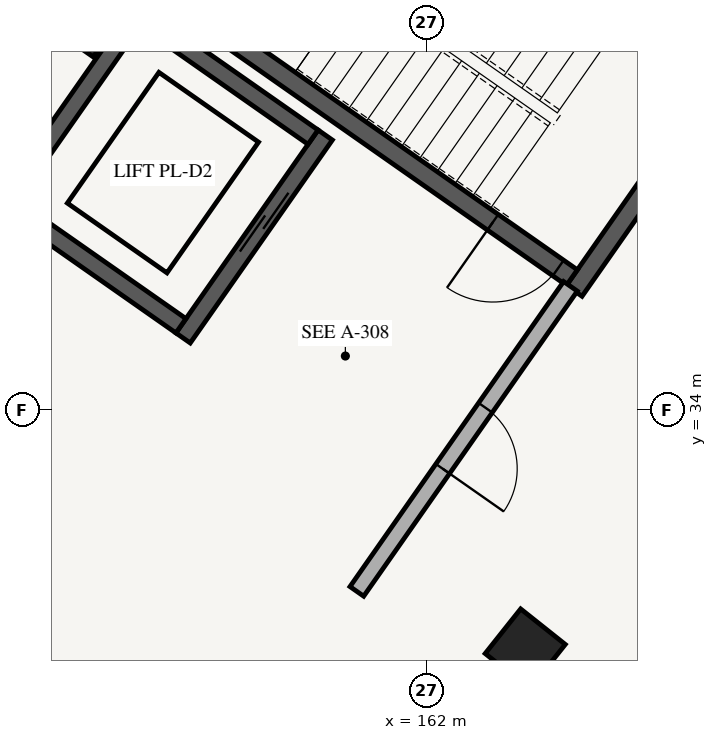
"""IFC4 building model, lengths in metres.
Left out: names, types, materials, properties, quantities, classifications, styles, units other than length and angle.
Written with IfcOpenShell. Run it as: python <this file> out.ifc"""

import sys

from ifc_helpers import new_model, si_unit, direction, frame, frame_2d, origin, origin_2d, place, context, subcontext, project, spatial, rectangle, extrude, element, fill, save


model = new_model("IFC4")
c1 = context("Model", 3, precision=1e-05, world=origin(), true_north=direction((0.0, 1.0)))
c2 = subcontext(c1, "Body", "Model", "MODEL_VIEW")
j1 = project(units=[si_unit("LENGTHUNIT", "METRE"), si_unit("PLANEANGLEUNIT", "RADIAN")], contexts=[c1])
p1 = place(None, origin())
s1 = spatial("IfcSite", under=j1, at=p1, CompositionType="ELEMENT")
p2 = place(p1, origin())
s2 = spatial("IfcBuilding", under=s1, at=p2, CompositionType="ELEMENT")
p3 = place(p2, frame((0.0, 0.0, -4.2)))
s3 = spatial("IfcBuildingStorey", under=s2, at=p3, CompositionType="ELEMENT", Elevation=-4.2)
p4 = place(p3, frame((165.733, 38.336, 0.0), z_axis=(0.0, 0.0, 1.0), x_axis=(-0.819153711596, 0.573574055182, 0.0)))
e1 = element("IfcWall", 1, at=p4, inside=s3, PredefinedType="SHEAR", context=c2, shape_type="SweptSolid", body=[
    extrude(rectangle(XDim=6.6, YDim=0.25, at=frame_2d((3.3, 0.0))), origin(), (0.0, 0.0, 1.0), 3.92),
])
p5 = place(p3, frame((165.907, 38.366, 0.0), z_axis=(0.0, 0.0, 1.0), x_axis=(-0.573582112484, -0.819148069789, 0.0)))
e2 = element("IfcWall", 2, at=p5, inside=s3, PredefinedType="SHEAR", context=c2, shape_type="SweptSolid", body=[
    extrude(rectangle(XDim=3.42, YDim=0.25, at=frame_2d((1.71, 0.0))), origin(), (0.0, 0.0, 1.0), 3.92),
])
p6 = place(p3, frame((163.914, 35.739, 0.0), z_axis=(0.0, 0.0, 1.0), x_axis=(-0.819153711596, 0.573574055182, 0.0)))
e3 = element("IfcWall", 3, at=p6, inside=s3, PredefinedType="SHEAR", context=c2, shape_type="SweptSolid", body=[
    extrude(rectangle(XDim=6.6, YDim=0.25, at=frame_2d((3.3, 0.0))), origin(), (0.0, 0.0, 1.0), 3.92),
])
p7 = place(p6, frame((0.22, 0.0, 0.0)))
e4 = element("IfcOpeningElement", 4, at=p7, cuts=e3, PredefinedType="OPENING", context=c2, shape_type="SweptSolid", body=[
    extrude(rectangle(XDim=1.05, YDim=2.15, at=frame_2d((0.525, 1.075))), frame((0.0, 0.135, 0.0), z_axis=(0.0, -1.0, 0.0), x_axis=(1.0, 0.0, 0.0)), (0.0, 0.0, 1.0), 0.27),
])
p8 = place(p3, frame((160.668, 37.615, 0.0), z_axis=(0.0, 0.0, 1.0), x_axis=(-0.573582966431, -0.819147471839, 0.0)))
e5 = element("IfcWall", 5, at=p8, inside=s3, PredefinedType="SHEAR", context=c2, shape_type="SweptSolid", body=[
    extrude(rectangle(XDim=3.26, YDim=0.23, at=frame_2d((1.63, 0.0))), origin(), (0.0, 0.0, 1.0), 3.92),
])
p9 = place(p8, frame((0.9, 0.0, 0.0)))
e6 = element("IfcOpeningElement", 6, at=p9, cuts=e5, PredefinedType="OPENING", context=c2, shape_type="SweptSolid", body=[
    extrude(rectangle(XDim=1.0, YDim=2.15, at=frame_2d((0.5, 1.075))), frame((0.0, 0.125, 0.0), z_axis=(0.0, -1.0, 0.0), x_axis=(1.0, 0.0, 0.0)), (0.0, 0.0, 1.0), 0.25),
])
p10 = place(p3, frame((158.268, 39.296, 0.0), z_axis=(0.0, 0.0, 1.0), x_axis=(-0.573582966431, -0.819147471839, 0.0)))
e7 = element("IfcWall", 7, at=p10, inside=s3, PredefinedType="SHEAR", context=c2, shape_type="SweptSolid", body=[
    extrude(rectangle(XDim=3.26, YDim=0.23, at=frame_2d((1.63, 0.0))), origin(), (0.0, 0.0, 1.0), 3.92),
])
p11 = place(p3, frame((160.508, 37.587, 0.0), z_axis=(0.0, 0.0, 1.0), x_axis=(-0.819189439894, 0.573523026186, 0.0)))
e8 = element("IfcWall", 8, at=p11, inside=s3, PredefinedType="SHEAR", context=c2, shape_type="SweptSolid", body=[
    extrude(rectangle(XDim=2.7, YDim=0.23, at=frame_2d((1.35, 0.0))), origin(), (0.0, 0.0, 1.0), 3.92),
])
p12 = place(p3, frame((158.77, 35.105, 0.0), z_axis=(0.0, 0.0, 1.0), x_axis=(-0.819117209968, 0.573626181702, 0.0)))
e9 = element("IfcWall", 9, at=p12, inside=s3, PredefinedType="SHEAR", context=c2, shape_type="SweptSolid", body=[
    extrude(rectangle(XDim=2.7, YDim=0.23, at=frame_2d((1.35, 0.0))), origin(), (0.0, 0.0, 1.0), 3.92),
])
for number, where, z_axis, x_axis in (
    (10, (163.3, 30.853, 0.0), (0.0, 0.0, 1.0), (0.783, -0.623, 0.0)),
    (11, (157.522, 39.164, 0.0), (0.0, 0.0, 1.0), (0.822, -0.57, 0.0)),
):
    element("IfcColumn", number, at=place(p3, frame(where, z_axis=z_axis, x_axis=x_axis)), inside=s3, PredefinedType="COLUMN", context=c2, shape_type="SweptSolid", body=[
        extrude(rectangle(XDim=0.75, YDim=0.75, at=origin_2d()), origin(), (0.0, 0.0, 1.0), 3.92),
    ])
p13 = place(p3, frame((163.895, 35.624, 0.0), z_axis=(0.0, 0.0, 1.0), x_axis=(-0.573572687386, -0.819154669329, 0.0)))
e12 = element("IfcWall", 12, at=p13, inside=s3, PredefinedType="PARTITIONING", context=c2, shape_type="SweptSolid", body=[
    extrude(rectangle(XDim=4.9, YDim=0.22, at=frame_2d((2.45, 0.0))), origin(), (0.0, 0.0, 1.0), 3.18),
])
p14 = place(p13, frame((1.95, 0.0, 0.0)))
e13 = element("IfcOpeningElement", 13, at=p14, cuts=e12, PredefinedType="OPENING", context=c2, shape_type="SweptSolid", body=[
    extrude(rectangle(XDim=0.98, YDim=2.14, at=frame_2d((0.49, 1.07))), frame((0.0, 0.12, 0.0), z_axis=(0.0, -1.0, 0.0), x_axis=(1.0, 0.0, 0.0)), (0.0, 0.0, 1.0), 0.24),
])
p15 = place(p7, origin())
e14 = element("IfcDoor", 14, at=p15, inside=s3, OperationType="SINGLE_SWING_RIGHT", PredefinedType="DOOR", context=c2, shape_type="SweptSolid", body=[
    extrude(rectangle(XDim=1.05, YDim=2.15, at=frame_2d((0.525, 1.075))), frame((0.0, 0.025, 0.0), z_axis=(0.0, -1.0, 0.0), x_axis=(1.0, 0.0, 0.0)), (0.0, 0.0, 1.0), 0.05),
])
fill(e4, e14)
p16 = place(p9, origin())
e15 = element("IfcDoor", 15, at=p16, inside=s3, OperationType="DOUBLE_DOOR_SLIDING", PredefinedType="DOOR", context=c2, shape_type="SweptSolid", body=[
    extrude(rectangle(XDim=1.0, YDim=2.15, at=frame_2d((0.5, 1.075))), frame((0.0, 0.025, 0.0), z_axis=(0.0, -1.0, 0.0), x_axis=(1.0, 0.0, 0.0)), (0.0, 0.0, 1.0), 0.05),
])
fill(e6, e15)
p17 = place(p14, origin())
e16 = element("IfcDoor", 16, at=p17, inside=s3, OperationType="SINGLE_SWING_RIGHT", PredefinedType="DOOR", context=c2, shape_type="SweptSolid", body=[
    extrude(rectangle(XDim=0.98, YDim=2.14, at=frame_2d((0.49, 1.07))), frame((0.0, 0.025, 0.0), z_axis=(0.0, -1.0, 0.0), x_axis=(1.0, 0.0, 0.0)), (0.0, 0.0, 1.0), 0.05),
])
fill(e13, e16)
save(model, sys.argv[1])
